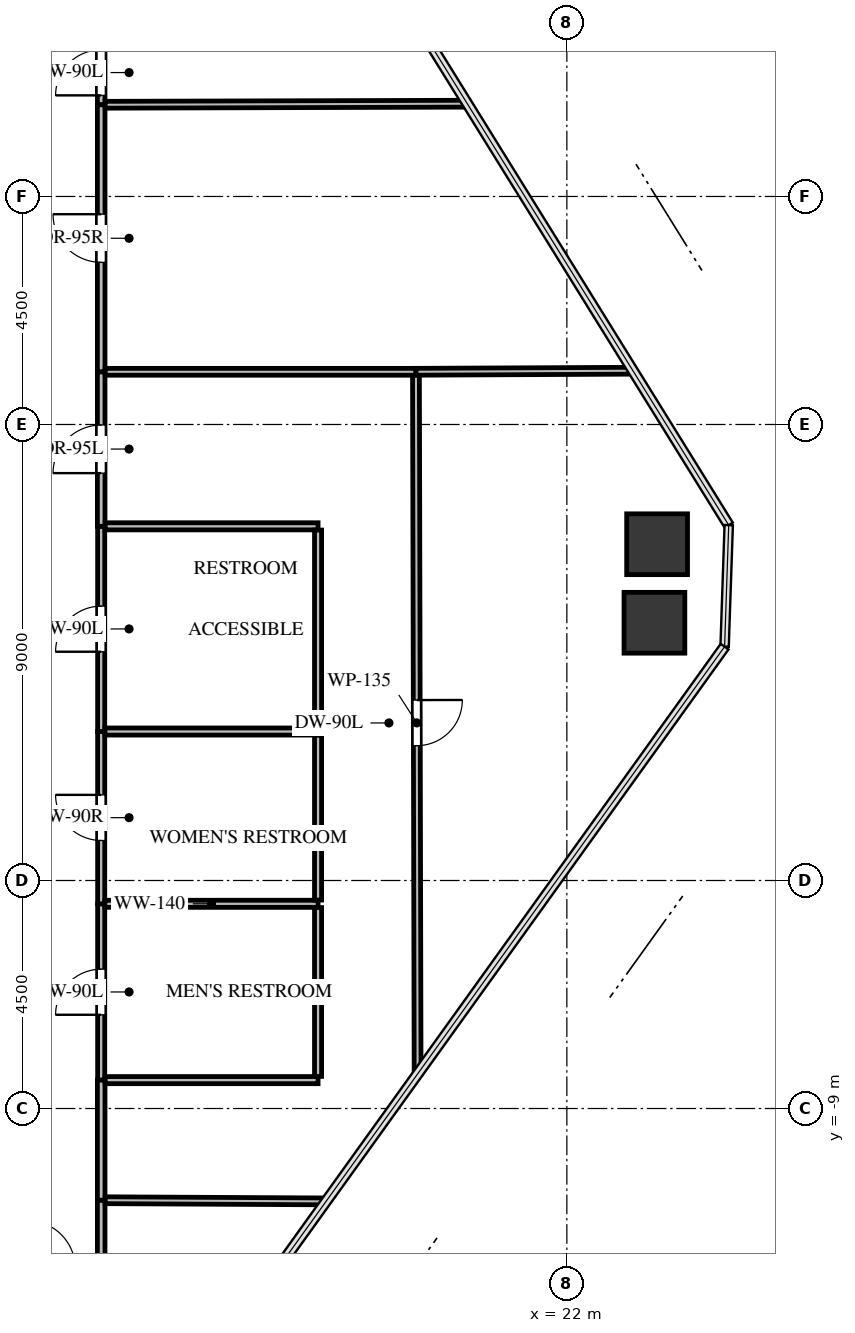
"""IFC4 building model, lengths in metres.
Left out: names, types, materials, properties, quantities, classifications, styles, units other than length and angle.
Written with IfcOpenShell. Run it as: python <this file> out.ifc"""

import sys

from ifc_helpers import new_model, si_unit, direction, frame, frame_2d, origin, origin_2d, place, context, subcontext, project, spatial, rectangle, extrude, source, transform, mapped, element, fill, save


model = new_model("IFC4")
c1 = context("Model", 3, precision=1e-05, world=origin(), true_north=direction((0.0, 1.0)))
c2 = subcontext(c1, "Body", "Model", "MODEL_VIEW")
j1 = project(units=[si_unit("LENGTHUNIT", "METRE"), si_unit("PLANEANGLEUNIT", "RADIAN")], contexts=[c1])
p1 = place(None, origin())
s1 = spatial("IfcSite", under=j1, at=p1, CompositionType="ELEMENT")
p2 = place(p1, origin())
s2 = spatial("IfcBuilding", under=s1, at=p2, CompositionType="ELEMENT")
p3 = place(p2, frame((0.0, 0.0, 133.8)))
s3 = spatial("IfcBuildingStorey", under=s2, at=p3, CompositionType="ELEMENT", Elevation=133.8)
m1 = source(origin(), c2, "Body", "SweptSolid", [
    extrude(rectangle(XDim=1.2, YDim=1.2, at=origin_2d()), origin(), (0.0, 0.0, 1.0), 3.3),
])
for number, where, z_axis, x_axis in (
    (1, (23.781, 2.137, -0.24), (0.0, 0.0, 1.0), (1.0, 0.0, 0.0)),
    (2, (23.728, 0.587, -0.24), (0.0, 0.0, 1.0), (1.0, 0.0, 0.0)),
):
    element("IfcColumn", number, at=place(p3, frame(where, z_axis=z_axis, x_axis=x_axis)), inside=s3, PredefinedType="COLUMN", context=c2, shape_type="MappedRepresentation", body=[
        mapped(m1, transform((0.0, 0.0, 0.0), x_axis=(1.0, 0.0, 0.0), y_axis=(0.0, 1.0, 0.0), z_axis=(0.0, 0.0, 1.0), scale=1.0)),
    ])
p4 = place(p3, frame((12.81, -8.44, 0.0), z_axis=(0.0, 0.0, 1.0), x_axis=(0.0, 1.0, 0.0)))
e3 = element("IfcWall", 3, at=p4, inside=s3, PredefinedType="PARTITIONING", context=c2, shape_type="SweptSolid", body=[
    extrude(rectangle(XDim=3.48, YDim=0.14, at=frame_2d((1.74, 0.0))), origin(), (0.0, 0.0, 1.0), 3.045),
])
p5 = place(p4, frame((1.29, 0.0, 0.0)))
e4 = element("IfcOpeningElement", 4, at=p5, cuts=e3, PredefinedType="OPENING", context=c2, shape_type="SweptSolid", body=[
    extrude(rectangle(XDim=0.9, YDim=2.05, at=frame_2d((0.45, 1.025))), frame((0.0, 0.08, 0.0), z_axis=(0.0, -1.0, 0.0), x_axis=(1.0, 0.0, 0.0)), (0.0, 0.0, 1.0), 0.16),
])
p6 = place(p3, frame((12.81, -4.96, 0.0), z_axis=(0.0, 0.0, 1.0), x_axis=(0.0, 1.0, 0.0)))
e5 = element("IfcWall", 5, at=p6, inside=s3, PredefinedType="PARTITIONING", context=c2, shape_type="SweptSolid", body=[
    extrude(rectangle(XDim=3.4, YDim=0.14, at=frame_2d((1.7, 0.0))), origin(), (0.0, 0.0, 1.0), 3.045),
])
p7 = place(p6, frame((1.25, 0.0, 0.0)))
e6 = element("IfcOpeningElement", 6, at=p7, cuts=e5, PredefinedType="OPENING", context=c2, shape_type="SweptSolid", body=[
    extrude(rectangle(XDim=0.9, YDim=2.05, at=frame_2d((0.45, 1.025))), frame((0.0, 0.08, 0.0), z_axis=(0.0, -1.0, 0.0), x_axis=(1.0, 0.0, 0.0)), (0.0, 0.0, 1.0), 0.16),
])
p8 = place(p3, frame((12.81, -1.56, 0.0), z_axis=(0.0, 0.0, 1.0), x_axis=(0.0, 1.0, 0.0)))
e7 = element("IfcWall", 7, at=p8, inside=s3, PredefinedType="PARTITIONING", context=c2, shape_type="SweptSolid", body=[
    extrude(rectangle(XDim=4.05, YDim=0.14, at=frame_2d((2.025, 0.0))), origin(), (0.0, 0.0, 1.0), 2.212),
])
p9 = place(p8, frame((1.575, 0.0, 0.0)))
e8 = element("IfcOpeningElement", 8, at=p9, cuts=e7, PredefinedType="OPENING", context=c2, shape_type="SweptSolid", body=[
    extrude(rectangle(XDim=0.9, YDim=2.05, at=frame_2d((0.45, 1.025))), frame((0.0, 0.08, 0.0), z_axis=(0.0, -1.0, 0.0), x_axis=(1.0, 0.0, 0.0)), (0.0, 0.0, 1.0), 0.16),
])
p10 = place(p3, frame((12.81, 10.81, 0.0), z_axis=(0.0, 0.0, 1.0), x_axis=(0.0, 1.0, 0.0)))
e9 = element("IfcWall", 9, at=p10, inside=s3, PredefinedType="PARTITIONING", context=c2, shape_type="SweptSolid", body=[
    extrude(rectangle(XDim=1.271, YDim=0.15, at=frame_2d((0.635, 0.0))), origin(), (0.0, 0.0, 1.0), 3.045),
])
p11 = place(p10, frame((0.186, 0.0, 0.0)))
e10 = element("IfcOpeningElement", 10, at=p11, cuts=e9, PredefinedType="OPENING", context=c2, shape_type="SweptSolid", body=[
    extrude(rectangle(XDim=0.9, YDim=2.05, at=frame_2d((0.45, 1.025))), frame((0.0, 0.085, 0.0), z_axis=(0.0, -1.0, 0.0), x_axis=(1.0, 0.0, 0.0)), (0.0, 0.0, 1.0), 0.17),
])
p12 = place(p3, frame((12.81, -12.081, 0.0), z_axis=(0.0, 0.0, 1.0), x_axis=(0.0, 1.0, 0.0)))
e11 = element("IfcWall", 11, at=p12, inside=s3, PredefinedType="PARTITIONING", context=c2, shape_type="SweptSolid", body=[
    extrude(rectangle(XDim=1.271, YDim=0.15, at=frame_2d((0.635, 0.0))), origin(), (0.0, 0.0, 1.0), 3.045),
])
p13 = place(p3, frame((12.81, 2.49, 0.0), z_axis=(0.0, 0.0, 1.0), x_axis=(0.0, 1.0, 0.0)))
e12 = element("IfcWall", 12, at=p13, inside=s3, PredefinedType="PARTITIONING", context=c2, shape_type="SweptSolid", body=[
    extrude(rectangle(XDim=3.05, YDim=0.15, at=frame_2d((1.525, 0.0))), origin(), (0.0, 0.0, 1.0), 3.045),
])
p14 = place(p13, frame((1.05, 0.0, 0.0)))
e13 = element("IfcOpeningElement", 13, at=p14, cuts=e12, PredefinedType="OPENING", context=c2, shape_type="SweptSolid", body=[
    extrude(rectangle(XDim=0.95, YDim=2.1, at=frame_2d((0.475, 1.05))), frame((0.0, 0.085, 0.0), z_axis=(0.0, -1.0, 0.0), x_axis=(1.0, 0.0, 0.0)), (0.0, 0.0, 1.0), 0.17),
])
p15 = place(p3, frame((12.81, -10.81, 0.0), z_axis=(0.0, 0.0, 1.0), x_axis=(0.0, 1.0, 0.0)))
e14 = element("IfcWall", 14, at=p15, inside=s3, PredefinedType="PARTITIONING", context=c2, shape_type="SweptSolid", body=[
    extrude(rectangle(XDim=2.37, YDim=0.15, at=frame_2d((1.185, 0.0))), origin(), (0.0, 0.0, 1.0), 3.045),
])
p16 = place(p3, frame((12.81, 5.54, 0.0), z_axis=(0.0, 0.0, 1.0), x_axis=(0.0, 1.0, 0.0)))
e15 = element("IfcWall", 15, at=p16, inside=s3, PredefinedType="PARTITIONING", context=c2, shape_type="SweptSolid", body=[
    extrude(rectangle(XDim=5.27, YDim=0.15, at=frame_2d((2.635, 0.0))), origin(), (0.0, 0.0, 1.0), 3.045),
])
p17 = place(p16, frame((2.16, 0.0, 0.0)))
e16 = element("IfcOpeningElement", 16, at=p17, cuts=e15, PredefinedType="OPENING", context=c2, shape_type="SweptSolid", body=[
    extrude(rectangle(XDim=0.95, YDim=2.1, at=frame_2d((0.475, 1.05))), frame((0.0, 0.085, 0.0), z_axis=(0.0, -1.0, 0.0), x_axis=(1.0, 0.0, 0.0)), (0.0, 0.0, 1.0), 0.17),
])
p18 = place(p3, frame((12.884, -4.96, 0.0), z_axis=(0.0, 0.0, 1.0), x_axis=(1.0, 0.0, 0.0)))
e17 = element("IfcWall", 17, at=p18, inside=s3, PredefinedType="PARTITIONING", context=c2, shape_type="SweptSolid", body=[
    extrude(rectangle(XDim=4.206, YDim=0.14, at=frame_2d((2.103, 0.0))), origin(), (0.0, 0.0, 1.0), 3.045),
])
p19 = place(p3, frame((17.09, -8.44, 0.0), z_axis=(0.0, 0.0, 1.0), x_axis=(-1.0, 0.0, 0.0)))
e18 = element("IfcWall", 18, at=p19, inside=s3, PredefinedType="PARTITIONING", context=c2, shape_type="SweptSolid", body=[
    extrude(rectangle(XDim=4.201, YDim=0.14, at=frame_2d((2.101, 0.0))), origin(), (0.0, 0.0, 1.0), 2.38),
])
p20 = place(p3, frame((17.09, -5.034, 0.0), z_axis=(0.0, 0.0, 1.0), x_axis=(0.0, -1.0, 0.0)))
e19 = element("IfcWall", 19, at=p20, inside=s3, PredefinedType="PARTITIONING", context=c2, shape_type="SweptSolid", body=[
    extrude(rectangle(XDim=3.332, YDim=0.14, at=frame_2d((1.666, 0.0))), origin(), (0.0, 0.0, 1.0), 2.38),
])
p21 = place(p3, frame((12.884, -1.56, 0.0), z_axis=(0.0, 0.0, 1.0), x_axis=(1.0, 0.0, 0.0)))
e20 = element("IfcWall", 20, at=p21, inside=s3, PredefinedType="PARTITIONING", context=c2, shape_type="SweptSolid", body=[
    extrude(rectangle(XDim=4.206, YDim=0.14, at=frame_2d((2.103, 0.0))), origin(), (0.0, 0.0, 1.0), 3.045),
])
p22 = place(p3, frame((17.09, -1.634, 0.0), z_axis=(0.0, 0.0, 1.0), x_axis=(0.0, -1.0, 0.0)))
e21 = element("IfcWall", 21, at=p22, inside=s3, PredefinedType="PARTITIONING", context=c2, shape_type="SweptSolid", body=[
    extrude(rectangle(XDim=3.252, YDim=0.14, at=frame_2d((1.626, 0.0))), origin(), (0.0, 0.0, 1.0), 3.045),
])
p23 = place(p3, frame((12.889, 2.49, 0.0), z_axis=(0.0, 0.0, 1.0), x_axis=(1.0, 0.0, 0.0)))
e22 = element("IfcWall", 22, at=p23, inside=s3, PredefinedType="PARTITIONING", context=c2, shape_type="SweptSolid", body=[
    extrude(rectangle(XDim=4.201, YDim=0.14, at=frame_2d((2.101, 0.0))), origin(), (0.0, 0.0, 1.0), 3.045),
])
p24 = place(p3, frame((17.09, 2.416, 0.0), z_axis=(0.0, 0.0, 1.0), x_axis=(0.0, -1.0, 0.0)))
e23 = element("IfcWall", 23, at=p24, inside=s3, PredefinedType="PARTITIONING", context=c2, shape_type="SweptSolid", body=[
    extrude(rectangle(XDim=3.902, YDim=0.14, at=frame_2d((1.951, 0.0))), origin(), (0.0, 0.0, 1.0), 2.212),
])
p25 = place(p3, frame((20.035, 10.831, 0.0), z_axis=(0.0, 0.0, 1.0), x_axis=(-0.999995783715, -0.002903885812, 0.0)))
e24 = element("IfcWall", 24, at=p25, inside=s3, PredefinedType="PARTITIONING", context=c2, shape_type="SweptSolid", body=[
    extrude(rectangle(XDim=7.146, YDim=0.135, at=frame_2d((3.573, 0.0))), origin(), (0.0, 0.0, 1.0), 2.38),
])
p26 = place(p3, frame((12.889, -10.81, 0.0), z_axis=(0.0, 0.0, 1.0), x_axis=(0.999986140562, -0.005264853658, 0.0)))
e25 = element("IfcWall", 25, at=p26, inside=s3, PredefinedType="PARTITIONING", context=c2, shape_type="SweptSolid", body=[
    extrude(rectangle(XDim=4.359, YDim=0.135, at=frame_2d((2.179, 0.0))), origin(), (0.0, 0.0, 1.0), 2.38),
])
p27 = place(p3, frame((19.022, 5.54, 0.0), z_axis=(0.0, 0.0, 1.0), x_axis=(0.002343027886, -0.999997255106, 0.0)))
e26 = element("IfcWall", 26, at=p27, inside=s3, PredefinedType="PARTITIONING", context=c2, shape_type="SweptSolid", body=[
    extrude(rectangle(XDim=13.858, YDim=0.135, at=frame_2d((6.929, 0.0))), origin(), (0.0, 0.0, 1.0), 2.212),
])
p28 = place(p27, frame((6.479, 0.0, 0.0)))
e27 = element("IfcOpeningElement", 27, at=p28, cuts=e26, PredefinedType="OPENING", context=c2, shape_type="SweptSolid", body=[
    extrude(rectangle(XDim=0.9, YDim=2.05, at=frame_2d((0.45, 1.025))), frame((0.0, 0.078, 0.0), z_axis=(0.0, -1.0, 0.0), x_axis=(1.0, 0.0, 0.0)), (0.0, 0.0, 1.0), 0.155),
])
p29 = place(p3, frame((12.889, 5.54, 0.0), z_axis=(0.0, 0.0, 1.0), x_axis=(1.0, 0.0, 0.0)))
e28 = element("IfcWall", 28, at=p29, inside=s3, PredefinedType="PARTITIONING", context=c2, shape_type="SweptSolid", body=[
    extrude(rectangle(XDim=6.133, YDim=0.135, at=frame_2d((3.066, 0.0))), origin(), (0.0, 0.0, 1.0), 3.045),
])
p30 = place(p3, frame((19.022, 5.54, 0.0), z_axis=(0.0, 0.0, 1.0), x_axis=(0.999988258028, 0.004846009232, 0.0)))
e29 = element("IfcWall", 29, at=p30, inside=s3, PredefinedType="PARTITIONING", context=c2, shape_type="SweptSolid", body=[
    extrude(rectangle(XDim=4.282, YDim=0.135, at=frame_2d((2.141, 0.0))), origin(), (0.0, 0.0, 1.0), 2.38),
])
m2 = source(origin(), c2, "Body", "SweptSolid", [
    extrude(rectangle(XDim=0.9, YDim=2.05, at=frame_2d((0.45, 1.025))), frame((0.0, 0.025, 0.0), z_axis=(0.0, -1.0, 0.0), x_axis=(1.0, 0.0, 0.0)), (0.0, 0.0, 1.0), 0.05),
])
p31 = place(p5, origin())
e30 = element("IfcDoor", 30, at=p31, inside=s3, OperationType="SINGLE_SWING_LEFT", PredefinedType="DOOR", context=c2, shape_type="MappedRepresentation", body=[
    mapped(m2, transform((0.0, 0.0, 0.0), x_axis=(1.0, 0.0, 0.0), y_axis=(0.0, 1.0, 0.0), z_axis=(0.0, 0.0, 1.0), scale=1.0)),
])
fill(e4, e30)
m3 = source(origin(), c2, "Body", "SweptSolid", [
    extrude(rectangle(XDim=0.9, YDim=2.05, at=frame_2d((0.45, 1.025))), frame((0.0, 0.025, 0.0), z_axis=(0.0, -1.0, 0.0), x_axis=(1.0, 0.0, 0.0)), (0.0, 0.0, 1.0), 0.05),
])
p32 = place(p7, origin())
e31 = element("IfcDoor", 31, at=p32, inside=s3, OperationType="SINGLE_SWING_RIGHT", PredefinedType="DOOR", context=c2, shape_type="MappedRepresentation", body=[
    mapped(m3, transform((0.0, 0.0, 0.0), x_axis=(1.0, 0.0, 0.0), y_axis=(0.0, 1.0, 0.0), z_axis=(0.0, 0.0, 1.0), scale=1.0)),
])
fill(e6, e31)
p33 = place(p9, origin())
e32 = element("IfcDoor", 32, at=p33, inside=s3, OperationType="SINGLE_SWING_LEFT", PredefinedType="DOOR", context=c2, shape_type="MappedRepresentation", body=[
    mapped(m2, transform((0.0, 0.0, 0.0), x_axis=(1.0, 0.0, 0.0), y_axis=(0.0, 1.0, 0.0), z_axis=(0.0, 0.0, 1.0), scale=1.0)),
])
fill(e8, e32)
p34 = place(p11, origin())
e33 = element("IfcDoor", 33, at=p34, inside=s3, OperationType="SINGLE_SWING_LEFT", PredefinedType="DOOR", context=c2, shape_type="MappedRepresentation", body=[
    mapped(m2, transform((0.0, 0.0, 0.0), x_axis=(1.0, 0.0, 0.0), y_axis=(0.0, 1.0, 0.0), z_axis=(0.0, 0.0, 1.0), scale=1.0)),
])
fill(e10, e33)
m4 = source(origin(), c2, "Body", "SweptSolid", [
    extrude(rectangle(XDim=0.95, YDim=2.1, at=frame_2d((0.475, 1.05))), frame((0.0, 0.025, 0.0), z_axis=(0.0, -1.0, 0.0), x_axis=(1.0, 0.0, 0.0)), (0.0, 0.0, 1.0), 0.05),
])
p35 = place(p14, origin())
e34 = element("IfcDoor", 34, at=p35, inside=s3, OperationType="SINGLE_SWING_LEFT", PredefinedType="DOOR", context=c2, shape_type="MappedRepresentation", body=[
    mapped(m4, transform((0.0, 0.0, 0.0), x_axis=(1.0, 0.0, 0.0), y_axis=(0.0, 1.0, 0.0), z_axis=(0.0, 0.0, 1.0), scale=1.0)),
])
fill(e13, e34)
m5 = source(origin(), c2, "Body", "SweptSolid", [
    extrude(rectangle(XDim=0.95, YDim=2.1, at=frame_2d((0.475, 1.05))), frame((0.0, 0.025, 0.0), z_axis=(0.0, -1.0, 0.0), x_axis=(1.0, 0.0, 0.0)), (0.0, 0.0, 1.0), 0.05),
])
p36 = place(p17, origin())
e35 = element("IfcDoor", 35, at=p36, inside=s3, OperationType="SINGLE_SWING_RIGHT", PredefinedType="DOOR", context=c2, shape_type="MappedRepresentation", body=[
    mapped(m5, transform((0.0, 0.0, 0.0), x_axis=(1.0, 0.0, 0.0), y_axis=(0.0, 1.0, 0.0), z_axis=(0.0, 0.0, 1.0), scale=1.0)),
])
fill(e16, e35)
p37 = place(p28, origin())
e36 = element("IfcDoor", 36, at=p37, inside=s3, OperationType="SINGLE_SWING_LEFT", PredefinedType="DOOR", context=c2, shape_type="MappedRepresentation", body=[
    mapped(m2, transform((0.0, 0.0, 0.0), x_axis=(1.0, 0.0, 0.0), y_axis=(0.0, 1.0, 0.0), z_axis=(0.0, 0.0, 1.0), scale=1.0)),
])
fill(e27, e36)
save(model, sys.argv[1])
